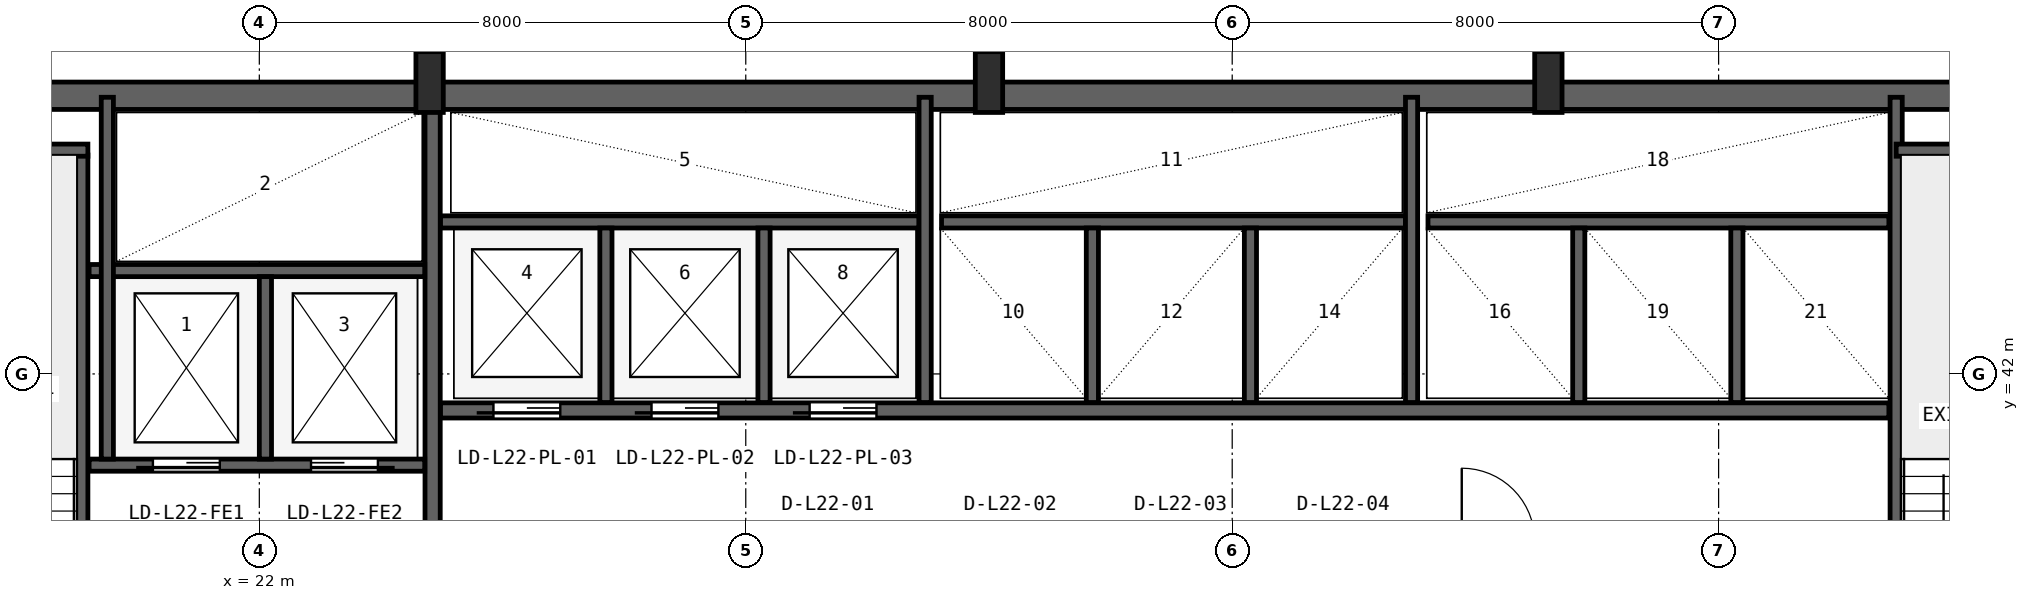
"""IFC4 building model, lengths in metres.
Left out: names, types, materials, properties, quantities, classifications, styles, units other than length and angle.
Written with IfcOpenShell. Run it as: python <this file> out.ifc"""

import sys

from ifc_helpers import new_model, si_unit, direction, frame, frame_2d, origin, origin_2d, place, context, subcontext, project, spatial, rectangle, i_section, extrude, source, transform, mapped, element, fill, save


model = new_model("IFC4")
c1 = context("Model", 3, precision=1e-05, world=origin(), true_north=direction((0.0, 1.0)))
c2 = subcontext(c1, "Body", "Model", "MODEL_VIEW")
j1 = project(units=[si_unit("LENGTHUNIT", "METRE"), si_unit("PLANEANGLEUNIT", "RADIAN")], contexts=[c1])
p1 = place(None, origin())
s1 = spatial("IfcSite", under=j1, at=p1, CompositionType="ELEMENT")
p2 = place(p1, origin())
s2 = spatial("IfcBuilding", under=s1, at=p2, CompositionType="ELEMENT")
p3 = place(p2, frame((0.0, 0.0, 94.6)))
s3 = spatial("IfcBuildingStorey", under=s2, at=p3, CompositionType="ELEMENT", Elevation=94.6)
p4 = place(p3, frame((15.6, 46.575, 0.0), z_axis=(0.0, 0.0, 1.0), x_axis=(1.0, 0.0, 0.0)))
e1 = element("IfcWall", 1, at=p4, inside=s3, PredefinedType="SHEAR", context=c2, shape_type="SweptSolid", body=[
    extrude(rectangle(XDim=36.8, YDim=0.45, at=frame_2d((18.4, 0.0))), origin(), (0.0, 0.0, 1.0), 3.52),
])
m1 = source(origin(), c2, "Body", "SweptSolid", [
    extrude(i_section(OverallWidth=0.45, OverallDepth=1.0, WebThickness=0.016, FlangeThickness=0.03, FilletRadius=0.016, at=origin_2d()), origin(), (0.0, 0.0, 1.0), 3.8),
])
for number, where, z_axis, x_axis in (
    (2, (24.8, 46.8, 0.0), (0.0, 0.0, 1.0), (1.0, 0.0, 0.0)),
    (3, (34.0, 46.8, 0.0), (0.0, 0.0, 1.0), (1.0, 0.0, 0.0)),
    (4, (43.2, 46.8, 0.0), (0.0, 0.0, 1.0), (1.0, 0.0, 0.0)),
):
    element("IfcColumn", number, at=place(p3, frame(where, z_axis=z_axis, x_axis=x_axis)), inside=s3, PredefinedType="COLUMN", context=c2, shape_type="MappedRepresentation", body=[
        mapped(m1, transform((0.0, 0.0, 0.0), x_axis=(1.0, 0.0, 0.0), y_axis=(0.0, 1.0, 0.0), z_axis=(0.0, 0.0, 1.0), scale=1.0)),
    ])
p5 = place(p3, frame((19.08, 35.95, 0.0), z_axis=(0.0, 0.0, 1.0), x_axis=(0.0, 1.0, 0.0)))
e5 = element("IfcWall", 5, at=p5, inside=s3, PredefinedType="SHEAR", context=c2, shape_type="SweptSolid", body=[
    extrude(rectangle(XDim=9.65, YDim=0.2, at=frame_2d((4.825, 0.0))), origin(), (0.0, 0.0, 1.0), 3.52),
])
p6 = place(p5, frame((0.25, 0.0, 0.0)))
e6 = element("IfcOpeningElement", 6, at=p6, cuts=e5, PredefinedType="OPENING", context=c2, shape_type="SweptSolid", body=[
    extrude(rectangle(XDim=0.95, YDim=2.1, at=frame_2d((0.475, 1.05))), frame((0.0, 0.11, 0.0), z_axis=(0.0, -1.0, 0.0), x_axis=(1.0, 0.0, 0.0)), (0.0, 0.0, 1.0), 0.22),
])
p7 = place(p3, frame((15.95, 45.68, 0.0), z_axis=(0.0, 0.0, 1.0), x_axis=(1.0, 0.0, 0.0)))
e7 = element("IfcWall", 7, at=p7, inside=s3, PredefinedType="SHEAR", context=c2, shape_type="SweptSolid", body=[
    extrude(rectangle(XDim=3.23, YDim=0.2, at=frame_2d((1.615, 0.0))), origin(), (0.0, 0.0, 1.0), 3.52),
])
p8 = place(p3, frame((24.85, 36.05, 0.0), z_axis=(0.0, 0.0, 1.0), x_axis=(0.0, 1.0, 0.0)))
e8 = element("IfcWall", 8, at=p8, inside=s3, PredefinedType="SHEAR", context=c2, shape_type="SweptSolid", body=[
    extrude(rectangle(XDim=10.45, YDim=0.25, at=frame_2d((5.225, 0.0))), origin(), (0.0, 0.0, 1.0), 3.52),
])
p9 = place(p3, frame((19.2, 40.5, 0.0), z_axis=(0.0, 0.0, 1.0), x_axis=(1.0, 0.0, 0.0)))
e9 = element("IfcWall", 9, at=p9, inside=s3, PredefinedType="SHEAR", context=c2, shape_type="SweptSolid", body=[
    extrude(rectangle(XDim=5.52, YDim=0.2, at=frame_2d((2.76, 0.0))), origin(), (0.0, 0.0, 1.0), 3.52),
])
p10 = place(p9, frame((1.05, 0.0, 0.0)))
e10 = element("IfcOpeningElement", 10, at=p10, cuts=e9, PredefinedType="OPENING", context=c2, shape_type="SweptSolid", body=[
    extrude(rectangle(XDim=1.1, YDim=2.18, at=frame_2d((0.55, 1.09))), frame((0.0, 0.11, 0.0), z_axis=(0.0, -1.0, 0.0), x_axis=(1.0, 0.0, 0.0)), (0.0, 0.0, 1.0), 0.22),
])
p11 = place(p9, frame((3.65, 0.0, 0.0)))
e11 = element("IfcOpeningElement", 11, at=p11, cuts=e9, PredefinedType="OPENING", context=c2, shape_type="SweptSolid", body=[
    extrude(rectangle(XDim=1.1, YDim=2.18, at=frame_2d((0.55, 1.09))), frame((0.0, 0.11, 0.0), z_axis=(0.0, -1.0, 0.0), x_axis=(1.0, 0.0, 0.0)), (0.0, 0.0, 1.0), 0.22),
])
p12 = place(p3, frame((19.2, 43.7, 0.0), z_axis=(0.0, 0.0, 1.0), x_axis=(1.0, 0.0, 0.0)))
e12 = element("IfcWall", 12, at=p12, inside=s3, PredefinedType="SHEAR", context=c2, shape_type="SweptSolid", body=[
    extrude(rectangle(XDim=5.52, YDim=0.2, at=frame_2d((2.76, 0.0))), origin(), (0.0, 0.0, 1.0), 3.52),
])
p13 = place(p3, frame((22.1, 40.6, 0.0), z_axis=(0.0, 0.0, 1.0), x_axis=(0.0, 1.0, 0.0)))
e13 = element("IfcWall", 13, at=p13, inside=s3, PredefinedType="SHEAR", context=c2, shape_type="SweptSolid", body=[
    extrude(rectangle(XDim=3.0, YDim=0.2, at=frame_2d((1.5, 0.0))), origin(), (0.0, 0.0, 1.0), 3.52),
])
p14 = place(p3, frame((19.5, 40.6, 0.0), z_axis=(0.0, 0.0, 1.0), x_axis=(0.0, 1.0, 0.0)))
e14 = element("IfcWall", 14, at=p14, inside=s3, PredefinedType="SHEAR", context=c2, shape_type="SweptSolid", body=[
    extrude(rectangle(XDim=5.95, YDim=0.2, at=frame_2d((2.975, 0.0))), origin(), (0.0, 0.0, 1.0), 3.52),
])
p15 = place(p3, frame((48.92, 36.05, 0.0), z_axis=(0.0, 0.0, 1.0), x_axis=(0.0, 1.0, 0.0)))
e15 = element("IfcWall", 15, at=p15, inside=s3, PredefinedType="SHEAR", context=c2, shape_type="SweptSolid", body=[
    extrude(rectangle(XDim=10.5, YDim=0.2, at=frame_2d((5.25, 0.0))), origin(), (0.0, 0.0, 1.0), 3.52),
])
p16 = place(p3, frame((48.92, 45.68, 0.0), z_axis=(0.0, 0.0, 1.0), x_axis=(1.0, 0.0, 0.0)))
e16 = element("IfcWall", 16, at=p16, inside=s3, PredefinedType="SHEAR", context=c2, shape_type="SweptSolid", body=[
    extrude(rectangle(XDim=3.18, YDim=0.2, at=frame_2d((1.59, 0.0))), origin(), (0.0, 0.0, 1.0), 3.52),
])
p17 = place(p3, frame((24.98, 41.4, 0.0), z_axis=(0.0, 0.0, 1.0), x_axis=(1.0, 0.0, 0.0)))
e17 = element("IfcWall", 17, at=p17, inside=s3, PredefinedType="SHEAR", context=c2, shape_type="SweptSolid", body=[
    extrude(rectangle(XDim=23.82, YDim=0.25, at=frame_2d((11.91, 0.0))), origin(), (0.0, 0.0, 1.0), 3.52),
])
p18 = place(p17, frame((0.87, 0.0, 0.0)))
e18 = element("IfcOpeningElement", 18, at=p18, cuts=e17, PredefinedType="OPENING", context=c2, shape_type="SweptSolid", body=[
    extrude(rectangle(XDim=1.1, YDim=2.18, at=frame_2d((0.55, 1.09))), frame((0.0, 0.135, 0.0), z_axis=(0.0, -1.0, 0.0), x_axis=(1.0, 0.0, 0.0)), (0.0, 0.0, 1.0), 0.27),
])
p19 = place(p17, frame((3.47, 0.0, 0.0)))
e19 = element("IfcOpeningElement", 19, at=p19, cuts=e17, PredefinedType="OPENING", context=c2, shape_type="SweptSolid", body=[
    extrude(rectangle(XDim=1.1, YDim=2.18, at=frame_2d((0.55, 1.09))), frame((0.0, 0.135, 0.0), z_axis=(0.0, -1.0, 0.0), x_axis=(1.0, 0.0, 0.0)), (0.0, 0.0, 1.0), 0.27),
])
p20 = place(p17, frame((6.07, 0.0, 0.0)))
e20 = element("IfcOpeningElement", 20, at=p20, cuts=e17, PredefinedType="OPENING", context=c2, shape_type="SweptSolid", body=[
    extrude(rectangle(XDim=1.1, YDim=2.18, at=frame_2d((0.55, 1.09))), frame((0.0, 0.135, 0.0), z_axis=(0.0, -1.0, 0.0), x_axis=(1.0, 0.0, 0.0)), (0.0, 0.0, 1.0), 0.27),
])
p21 = place(p3, frame((24.98, 44.5, 0.0), z_axis=(0.0, 0.0, 1.0), x_axis=(1.0, 0.0, 0.0)))
e21 = element("IfcWall", 21, at=p21, inside=s3, PredefinedType="SHEAR", context=c2, shape_type="SweptSolid", body=[
    extrude(rectangle(XDim=7.87, YDim=0.2, at=frame_2d((3.935, 0.0))), origin(), (0.0, 0.0, 1.0), 3.52),
])
for number, where, z_axis, x_axis in (
    (22, (27.7, 41.53, 0.0), (0.0, 0.0, 1.0), (0.0, 1.0, 0.0)),
    (23, (30.3, 41.53, 0.0), (0.0, 0.0, 1.0), (0.0, 1.0, 0.0)),
):
    element("IfcWall", number, at=place(p3, frame(where, z_axis=z_axis, x_axis=x_axis)), inside=s3, PredefinedType="SHEAR", context=c2, shape_type="SweptSolid", body=[
        extrude(rectangle(XDim=2.87, YDim=0.2, at=frame_2d((1.435, 0.0))), origin(), (0.0, 0.0, 1.0), 3.52),
    ])
p22 = place(p3, frame((32.95, 41.53, 0.0), z_axis=(0.0, 0.0, 1.0), x_axis=(0.0, 1.0, 0.0)))
e24 = element("IfcWall", 24, at=p22, inside=s3, PredefinedType="SHEAR", context=c2, shape_type="SweptSolid", body=[
    extrude(rectangle(XDim=5.02, YDim=0.2, at=frame_2d((2.51, 0.0))), origin(), (0.0, 0.0, 1.0), 3.52),
])
p23 = place(p3, frame((33.22, 44.5, 0.0), z_axis=(0.0, 0.0, 1.0), x_axis=(1.0, 0.0, 0.0)))
e25 = element("IfcWall", 25, at=p23, inside=s3, PredefinedType="SHEAR", context=c2, shape_type="SweptSolid", body=[
    extrude(rectangle(XDim=7.63, YDim=0.2, at=frame_2d((3.815, 0.0))), origin(), (0.0, 0.0, 1.0), 3.52),
])
for number, where, z_axis, x_axis in (
    (26, (35.7, 41.53, 0.0), (0.0, 0.0, 1.0), (0.0, 1.0, 0.0)),
    (27, (38.3, 41.53, 0.0), (0.0, 0.0, 1.0), (0.0, 1.0, 0.0)),
):
    element("IfcWall", number, at=place(p3, frame(where, z_axis=z_axis, x_axis=x_axis)), inside=s3, PredefinedType="SHEAR", context=c2, shape_type="SweptSolid", body=[
        extrude(rectangle(XDim=2.87, YDim=0.2, at=frame_2d((1.435, 0.0))), origin(), (0.0, 0.0, 1.0), 3.52),
    ])
p24 = place(p3, frame((40.95, 41.53, 0.0), z_axis=(0.0, 0.0, 1.0), x_axis=(0.0, 1.0, 0.0)))
e28 = element("IfcWall", 28, at=p24, inside=s3, PredefinedType="SHEAR", context=c2, shape_type="SweptSolid", body=[
    extrude(rectangle(XDim=5.02, YDim=0.2, at=frame_2d((2.51, 0.0))), origin(), (0.0, 0.0, 1.0), 3.52),
])
p25 = place(p3, frame((41.22, 44.5, 0.0), z_axis=(0.0, 0.0, 1.0), x_axis=(1.0, 0.0, 0.0)))
e29 = element("IfcWall", 29, at=p25, inside=s3, PredefinedType="SHEAR", context=c2, shape_type="SweptSolid", body=[
    extrude(rectangle(XDim=7.58, YDim=0.2, at=frame_2d((3.79, 0.0))), origin(), (0.0, 0.0, 1.0), 3.52),
])
for number, where, z_axis, x_axis in (
    (30, (43.7, 41.53, 0.0), (0.0, 0.0, 1.0), (0.0, 1.0, 0.0)),
    (31, (46.3, 41.53, 0.0), (0.0, 0.0, 1.0), (0.0, 1.0, 0.0)),
):
    element("IfcWall", number, at=place(p3, frame(where, z_axis=z_axis, x_axis=x_axis)), inside=s3, PredefinedType="SHEAR", context=c2, shape_type="SweptSolid", body=[
        extrude(rectangle(XDim=2.87, YDim=0.2, at=frame_2d((1.435, 0.0))), origin(), (0.0, 0.0, 1.0), 3.52),
    ])
m2 = source(origin(), c2, "Body", "SweptSolid", [
    extrude(rectangle(XDim=1.1, YDim=2.18, at=frame_2d((0.55, 1.09))), frame((0.0, 0.025, 0.0), z_axis=(0.0, -1.0, 0.0), x_axis=(1.0, 0.0, 0.0)), (0.0, 0.0, 1.0), 0.05),
])
p26 = place(p10, frame((1.1, 0.0, 0.0), z_axis=(0.0, 0.0, 1.0), x_axis=(-1.0, 0.0, 0.0)))
e32 = element("IfcDoor", 32, at=p26, inside=s3, OperationType="SLIDING_TO_LEFT", PredefinedType="DOOR", context=c2, shape_type="MappedRepresentation", body=[
    mapped(m2, transform((0.0, 0.0, 0.0), x_axis=(1.0, 0.0, 0.0), y_axis=(0.0, 1.0, 0.0), z_axis=(0.0, 0.0, 1.0), scale=1.0)),
])
fill(e10, e32)
p27 = place(p11, frame((1.1, 0.0, 0.0), z_axis=(0.0, 0.0, 1.0), x_axis=(-1.0, 0.0, 0.0)))
e33 = element("IfcDoor", 33, at=p27, inside=s3, OperationType="SLIDING_TO_RIGHT", PredefinedType="DOOR", context=c2, shape_type="MappedRepresentation", body=[
    mapped(m2, transform((0.0, 0.0, 0.0), x_axis=(1.0, 0.0, 0.0), y_axis=(0.0, 1.0, 0.0), z_axis=(0.0, 0.0, 1.0), scale=1.0)),
])
fill(e11, e33)
p28 = place(p18, frame((1.1, 0.0, 0.0), z_axis=(0.0, 0.0, 1.0), x_axis=(-1.0, 0.0, 0.0)))
e34 = element("IfcDoor", 34, at=p28, inside=s3, OperationType="SLIDING_TO_LEFT", PredefinedType="DOOR", context=c2, shape_type="MappedRepresentation", body=[
    mapped(m2, transform((0.0, 0.0, 0.0), x_axis=(1.0, 0.0, 0.0), y_axis=(0.0, 1.0, 0.0), z_axis=(0.0, 0.0, 1.0), scale=1.0)),
])
fill(e18, e34)
p29 = place(p19, frame((1.1, 0.0, 0.0), z_axis=(0.0, 0.0, 1.0), x_axis=(-1.0, 0.0, 0.0)))
e35 = element("IfcDoor", 35, at=p29, inside=s3, OperationType="SLIDING_TO_LEFT", PredefinedType="DOOR", context=c2, shape_type="MappedRepresentation", body=[
    mapped(m2, transform((0.0, 0.0, 0.0), x_axis=(1.0, 0.0, 0.0), y_axis=(0.0, 1.0, 0.0), z_axis=(0.0, 0.0, 1.0), scale=1.0)),
])
fill(e19, e35)
p30 = place(p20, frame((1.1, 0.0, 0.0), z_axis=(0.0, 0.0, 1.0), x_axis=(-1.0, 0.0, 0.0)))
e36 = element("IfcDoor", 36, at=p30, inside=s3, OperationType="SLIDING_TO_LEFT", PredefinedType="DOOR", context=c2, shape_type="MappedRepresentation", body=[
    mapped(m2, transform((0.0, 0.0, 0.0), x_axis=(1.0, 0.0, 0.0), y_axis=(0.0, 1.0, 0.0), z_axis=(0.0, 0.0, 1.0), scale=1.0)),
])
fill(e20, e36)
save(model, sys.argv[1])
